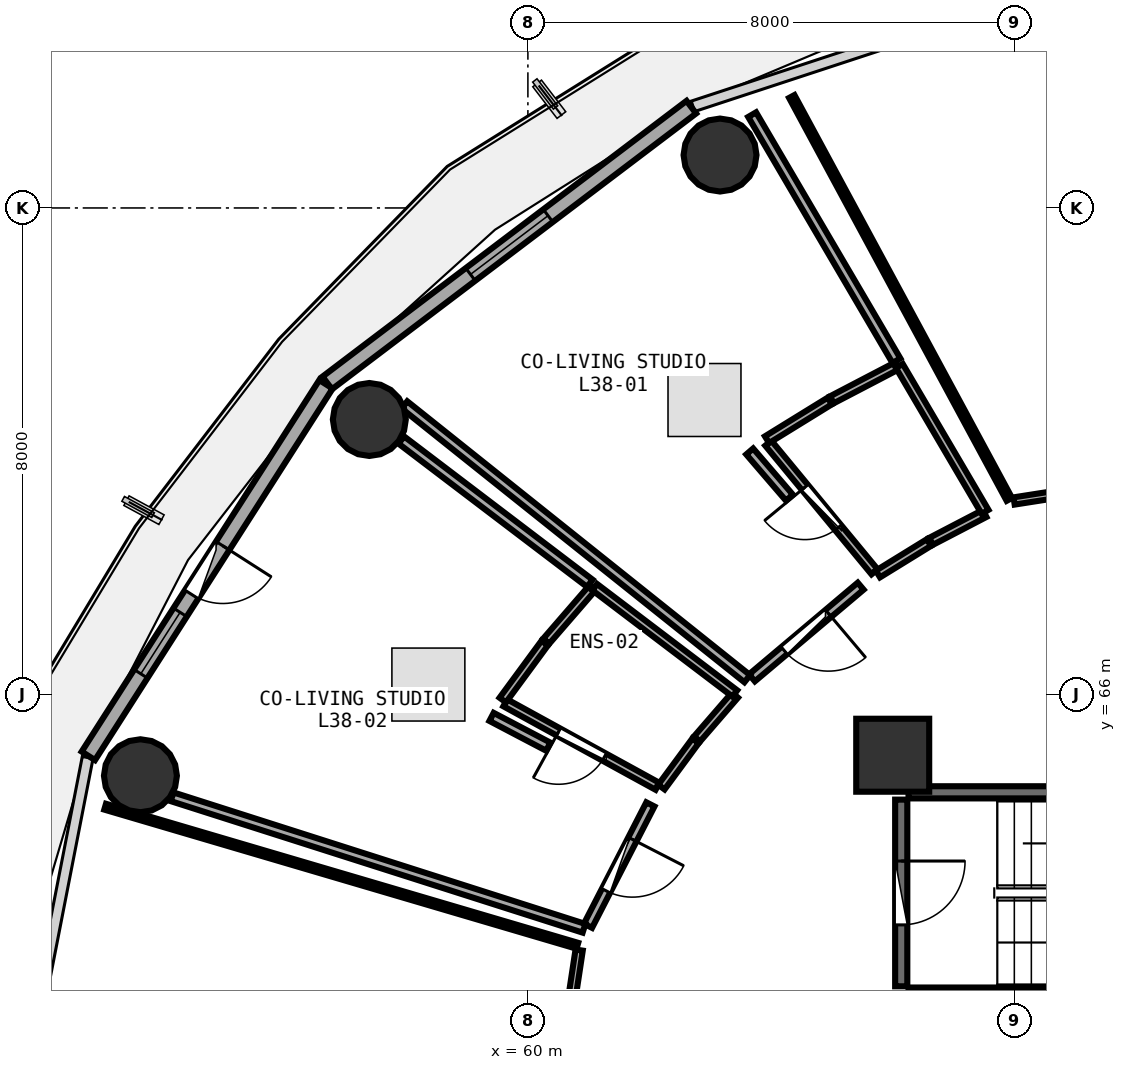
"""IFC4 building model, lengths in metres.
Left out: names, types, materials, properties, quantities, classifications, styles, units other than length and angle.
Written with IfcOpenShell. Run it as: python <this file> out.ifc"""

import sys

from ifc_helpers import new_model, si_unit, direction, frame, frame_2d, origin, origin_2d, place, context, subcontext, project, spatial, rectangle, circle, extrude, element, fill, save


model = new_model("IFC4")
c1 = context("Model", 3, precision=1e-05, world=origin(), true_north=direction((0.0, 1.0)))
c2 = subcontext(c1, "Body", "Model", "MODEL_VIEW")
j1 = project(units=[si_unit("LENGTHUNIT", "METRE"), si_unit("PLANEANGLEUNIT", "RADIAN")], contexts=[c1])
p1 = place(None, origin())
s1 = spatial("IfcSite", under=j1, at=p1, CompositionType="ELEMENT")
p2 = place(p1, origin())
s2 = spatial("IfcBuilding", under=s1, at=p2, CompositionType="ELEMENT")
p3 = place(p2, frame((0.0, 0.0, 150.6)))
s3 = spatial("IfcBuildingStorey", under=s2, at=p3, CompositionType="ELEMENT", Elevation=150.6)
p4 = place(p3, frame((66.0, 65.0, 0.0), z_axis=(0.0, 0.0, 1.0), x_axis=(1.0, 0.0, 0.0)))
e1 = element("IfcColumn", 1, at=p4, inside=s3, PredefinedType="PILASTER", context=c2, shape_type="SweptSolid", body=[
    extrude(rectangle(XDim=1.2, YDim=1.2, at=origin_2d()), origin(), (0.0, 0.0, 1.0), 3.75),
])
for number, where, z_axis, x_axis in (
    (2, (63.16, 74.87, 0.0), (0.0, 0.0, 1.0), (1.0, 0.0, 0.0)),
    (3, (57.392, 70.521, 0.0), (0.0, 0.0, 1.0), (1.0, 0.0, 0.0)),
    (4, (53.627, 64.663, 0.0), (0.0, 0.0, 1.0), (1.0, 0.0, 0.0)),
):
    element("IfcColumn", number, at=place(p3, frame(where, z_axis=z_axis, x_axis=x_axis)), inside=s3, PredefinedType="COLUMN", context=c2, shape_type="SweptSolid", body=[
        extrude(circle(Radius=0.6, at=origin_2d()), origin(), (0.0, 0.0, 1.0), 3.75),
    ])
p5 = place(p3, frame((62.688, 75.658, 0.0), z_axis=(0.0, 0.0, 1.0), x_axis=(-0.797163719609, -0.603763202042, 0.0)))
e5 = element("IfcWall", 5, at=p5, inside=s3, PredefinedType="SOLIDWALL", context=c2, shape_type="SweptSolid", body=[
    extrude(rectangle(XDim=7.512, YDim=0.26, at=frame_2d((3.756, 0.0))), origin(), (0.0, 0.0, 1.0), 3.475),
])
p6 = place(p5, frame((2.956, 0.0, 0.85)))
e6 = element("IfcOpeningElement", 6, at=p6, cuts=e5, PredefinedType="OPENING", context=c2, shape_type="SweptSolid", body=[
    extrude(rectangle(XDim=1.6, YDim=1.45, at=frame_2d((0.8, 0.725))), frame((0.0, 0.14, 0.0), z_axis=(0.0, -1.0, 0.0), x_axis=(1.0, 0.0, 0.0)), (0.0, 0.0, 1.0), 0.28),
])
p7 = place(p3, frame((56.679, 71.1, 0.0), z_axis=(0.0, 0.0, 1.0), x_axis=(-0.538801521808, -0.842432739213, 0.0)))
e7 = element("IfcWall", 7, at=p7, inside=s3, PredefinedType="SOLIDWALL", context=c2, shape_type="SweptSolid", body=[
    extrude(rectangle(XDim=7.253, YDim=0.26, at=frame_2d((3.627, 0.0))), origin(), (0.0, 0.0, 1.0), 3.475),
])
p8 = place(p7, frame((3.152, 0.0, 0.0)))
e8 = element("IfcOpeningElement", 8, at=p8, cuts=e7, PredefinedType="OPENING", context=c2, shape_type="SweptSolid", body=[
    extrude(rectangle(XDim=0.95, YDim=2.1, at=frame_2d((0.475, 1.05))), frame((0.0, 0.14, 0.0), z_axis=(0.0, -1.0, 0.0), x_axis=(1.0, 0.0, 0.0)), (0.0, 0.0, 1.0), 0.28),
])
p9 = place(p7, frame((4.452, 0.0, 0.85)))
e9 = element("IfcOpeningElement", 9, at=p9, cuts=e7, PredefinedType="OPENING", context=c2, shape_type="SweptSolid", body=[
    extrude(rectangle(XDim=1.2, YDim=1.45, at=frame_2d((0.6, 0.725))), frame((0.0, 0.14, 0.0), z_axis=(0.0, -1.0, 0.0), x_axis=(1.0, 0.0, 0.0)), (0.0, 0.0, 1.0), 0.28),
])
for number, where, z_axis, x_axis in (
    (10, (66.26, 61.08, 0.0), (0.0, 0.0, 1.0), (1.0, 0.0, 0.0)),
    (11, (73.42, 64.39, 0.0), (0.0, 0.0, 1.0), (-1.0, 0.0, 0.0)),
):
    element("IfcWall", number, at=place(p3, frame(where, z_axis=z_axis, x_axis=x_axis)), inside=s3, PredefinedType="SHEAR", context=c2, shape_type="SweptSolid", body=[
        extrude(rectangle(XDim=7.16, YDim=0.2, at=frame_2d((3.58, 0.0))), origin(), (0.0, 0.0, 1.0), 3.49),
    ])
p10 = place(p3, frame((66.14, 64.27, 0.0), z_axis=(0.0, 0.0, 1.0), x_axis=(0.0, -1.0, 0.0)))
e12 = element("IfcWall", 12, at=p10, inside=s3, PredefinedType="SHEAR", context=c2, shape_type="SweptSolid", body=[
    extrude(rectangle(XDim=3.07, YDim=0.2, at=frame_2d((1.535, 0.0))), origin(), (0.0, 0.0, 1.0), 3.49),
])
p11 = place(p10, frame((1.01, 0.0, 0.0)))
e13 = element("IfcOpeningElement", 13, at=p11, cuts=e12, PredefinedType="OPENING", context=c2, shape_type="SweptSolid", body=[
    extrude(rectangle(XDim=1.05, YDim=2.1, at=frame_2d((0.525, 1.05))), frame((0.0, 0.11, 0.0), z_axis=(0.0, -1.0, 0.0), x_axis=(1.0, 0.0, 0.0)), (0.0, 0.0, 1.0), 0.22),
])
p12 = place(p3, frame((75.447, 70.347, 0.0), z_axis=(0.0, 0.0, 1.0), x_axis=(-0.987988721118, -0.154526007337, 0.0)))
e14 = element("IfcWall", 14, at=p12, inside=s3, PredefinedType="PARTITIONING", context=c2, shape_type="SweptSolid", body=[
    extrude(rectangle(XDim=7.541, YDim=0.12, at=frame_2d((3.771, 0.0))), origin(), (0.0, 0.0, 1.0), 2.975),
])
p13 = place(p12, frame((3.32, 0.0, 0.0)))
e15 = element("IfcOpeningElement", 15, at=p13, cuts=e14, PredefinedType="OPENING", context=c2, shape_type="SweptSolid", body=[
    extrude(rectangle(XDim=0.9, YDim=2.08, at=frame_2d((0.45, 1.04))), frame((0.0, 0.07, 0.0), z_axis=(0.0, -1.0, 0.0), x_axis=(1.0, 0.0, 0.0)), (0.0, 0.0, 1.0), 0.14),
])
p14 = place(p3, frame((65.702, 68.016, 0.0), z_axis=(0.0, 0.0, 1.0), x_axis=(-0.636757315483, 0.771064278241, 0.0)))
e16 = element("IfcWall", 16, at=p14, inside=s3, PredefinedType="PLUMBINGWALL", context=c2, shape_type="SweptSolid", body=[
    extrude(rectangle(XDim=2.745, YDim=0.13, at=frame_2d((1.373, 0.0))), origin(), (0.0, 0.0, 1.0), 2.975),
])
p15 = place(p14, frame((0.942, 0.0, 0.0)))
e17 = element("IfcOpeningElement", 17, at=p15, cuts=e16, PredefinedType="OPENING", context=c2, shape_type="SweptSolid", body=[
    extrude(rectangle(XDim=0.86, YDim=2.05, at=frame_2d((0.43, 1.025))), frame((0.0, 0.075, 0.0), z_axis=(0.0, -1.0, 0.0), x_axis=(1.0, 0.0, 0.0)), (0.0, 0.0, 1.0), 0.15),
])
p16 = place(p3, frame((65.473, 67.78, 0.0), z_axis=(0.0, 0.0, 1.0), x_axis=(-0.764572750514, -0.644537438146, 0.0)))
e18 = element("IfcWall", 18, at=p16, inside=s3, PredefinedType="PARTITIONING", context=c2, shape_type="SweptSolid", body=[
    extrude(rectangle(XDim=2.339, YDim=0.15, at=frame_2d((1.169, 0.0))), origin(), (0.0, 0.0, 1.0), 2.975),
])
p17 = place(p16, frame((0.694, 0.0, 0.0)))
e19 = element("IfcOpeningElement", 19, at=p17, cuts=e18, PredefinedType="OPENING", context=c2, shape_type="SweptSolid", body=[
    extrude(rectangle(XDim=0.95, YDim=2.08, at=frame_2d((0.475, 1.04))), frame((0.0, 0.085, 0.0), z_axis=(0.0, -1.0, 0.0), x_axis=(1.0, 0.0, 0.0)), (0.0, 0.0, 1.0), 0.17),
])
p18 = place(p3, frame((62.131, 64.489, 0.0), z_axis=(0.0, 0.0, 1.0), x_axis=(-0.87680194327, 0.480851694681, 0.0)))
e20 = element("IfcWall", 20, at=p18, inside=s3, PredefinedType="PLUMBINGWALL", context=c2, shape_type="SweptSolid", body=[
    extrude(rectangle(XDim=2.855, YDim=0.13, at=frame_2d((1.428, 0.0))), origin(), (0.0, 0.0, 1.0), 2.975),
])
p19 = place(p18, frame((0.998, 0.0, 0.0)))
e21 = element("IfcOpeningElement", 21, at=p19, cuts=e20, PredefinedType="OPENING", context=c2, shape_type="SweptSolid", body=[
    extrude(rectangle(XDim=0.86, YDim=2.05, at=frame_2d((0.43, 1.025))), frame((0.0, 0.075, 0.0), z_axis=(0.0, -1.0, 0.0), x_axis=(1.0, 0.0, 0.0)), (0.0, 0.0, 1.0), 0.15),
])
p20 = place(p3, frame((62.015, 64.192, 0.0), z_axis=(0.0, 0.0, 1.0), x_axis=(-0.457234963971, -0.889345932538, 0.0)))
e22 = element("IfcWall", 22, at=p20, inside=s3, PredefinedType="PARTITIONING", context=c2, shape_type="SweptSolid", body=[
    extrude(rectangle(XDim=2.245, YDim=0.15, at=frame_2d((1.122, 0.0))), origin(), (0.0, 0.0, 1.0), 3.235),
])
p21 = place(p20, frame((0.647, 0.0, 0.0)))
e23 = element("IfcOpeningElement", 23, at=p21, cuts=e22, PredefinedType="OPENING", context=c2, shape_type="SweptSolid", body=[
    extrude(rectangle(XDim=0.95, YDim=2.08, at=frame_2d((0.475, 1.04))), frame((0.0, 0.085, 0.0), z_axis=(0.0, -1.0, 0.0), x_axis=(1.0, 0.0, 0.0)), (0.0, 0.0, 1.0), 0.17),
])
p22 = place(p3, frame((60.843, 61.796, 0.0), z_axis=(0.0, 0.0, 1.0), x_axis=(-0.149807046494, -0.988715251638, 0.0)))
e24 = element("IfcWall", 24, at=p22, inside=s3, PredefinedType="PARTITIONING", context=c2, shape_type="SweptSolid", body=[
    extrude(rectangle(XDim=4.338, YDim=0.12, at=frame_2d((2.169, 0.0))), origin(), (0.0, 0.0, 1.0), 2.975),
])
p23 = place(p22, frame((1.719, 0.0, 0.0)))
e25 = element("IfcOpeningElement", 25, at=p23, cuts=e24, PredefinedType="OPENING", context=c2, shape_type="SweptSolid", body=[
    extrude(rectangle(XDim=0.9, YDim=2.08, at=frame_2d((0.45, 1.04))), frame((0.0, 0.07, 0.0), z_axis=(0.0, -1.0, 0.0), x_axis=(1.0, 0.0, 0.0)), (0.0, 0.0, 1.0), 0.14),
])
p24 = place(p3, frame((67.918, 69.207, 0.0), z_axis=(0.0, 0.0, 1.0), x_axis=(-0.475160964166, 0.879898890858, 0.0)))
e26 = element("IfcWall", 26, at=p24, inside=s3, PredefinedType="PARTITIONING", context=c2, shape_type="SweptSolid", body=[
    extrude(rectangle(XDim=7.53, YDim=0.1, at=frame_2d((3.765, 0.0))), origin(), (0.0, 0.0, 1.0), 3.025),
])
p25 = place(p3, frame((67.511, 68.976, 0.0), z_axis=(0.0, 0.0, 1.0), x_axis=(-0.88687840459, -0.462002917168, 0.0)))
e27 = element("IfcWall", 27, at=p25, inside=s3, PredefinedType="PLUMBINGWALL", context=c2, shape_type="SweptSolid", body=[
    extrude(rectangle(XDim=0.993, YDim=0.13, at=frame_2d((0.497, 0.0))), origin(), (0.0, 0.0, 1.0), 3.235),
])
p26 = place(p3, frame((66.596, 68.498, 0.0), z_axis=(0.0, 0.0, 1.0), x_axis=(-0.851266784219, -0.52473313416, 0.0)))
e28 = element("IfcWall", 28, at=p26, inside=s3, PredefinedType="PLUMBINGWALL", context=c2, shape_type="SweptSolid", body=[
    extrude(rectangle(XDim=0.985, YDim=0.13, at=frame_2d((0.493, 0.0))), origin(), (0.0, 0.0, 1.0), 3.48),
])
p27 = place(p3, frame((63.933, 70.189, 0.0), z_axis=(0.0, 0.0, 1.0), x_axis=(0.851319302067, 0.524647925688, 0.0)))
e29 = element("IfcWall", 29, at=p27, inside=s3, PredefinedType="PLUMBINGWALL", context=c2, shape_type="SweptSolid", body=[
    extrude(rectangle(XDim=1.212, YDim=0.13, at=frame_2d((0.606, 0.0))), origin(), (0.0, 0.0, 1.0), 2.975),
])
p28 = place(p3, frame((65.0, 70.845, 0.0), z_axis=(0.0, 0.0, 1.0), x_axis=(0.886527747476, 0.462675429383, 0.0)))
e30 = element("IfcWall", 30, at=p28, inside=s3, PredefinedType="PLUMBINGWALL", context=c2, shape_type="SweptSolid", body=[
    extrude(rectangle(XDim=1.22, YDim=0.13, at=frame_2d((0.61, 0.0))), origin(), (0.0, 0.0, 1.0), 3.175),
])
p29 = place(p3, frame((66.109, 71.402, 0.0), z_axis=(0.0, 0.0, 1.0), x_axis=(0.506513995599, -0.862231739304, 0.0)))
e31 = element("IfcWall", 31, at=p29, inside=s3, PredefinedType="PLUMBINGWALL", context=c2, shape_type="SweptSolid", body=[
    extrude(rectangle(XDim=2.783, YDim=0.13, at=frame_2d((1.392, 0.0))), origin(), (0.0, 0.0, 1.0), 3.175),
])
p30 = place(p3, frame((63.608, 66.259, 0.0), z_axis=(0.0, 0.0, 1.0), x_axis=(-0.781429667655, 0.623993328898, 0.0)))
e32 = element("IfcWall", 32, at=p30, inside=s3, PredefinedType="PARTITIONING", context=c2, shape_type="SweptSolid", body=[
    extrude(rectangle(XDim=7.216, YDim=0.15, at=frame_2d((3.608, 0.0))), origin(), (0.0, 0.0, 1.0), 2.975),
])
p31 = place(p3, frame((63.688, 75.534, 0.0), z_axis=(0.0, 0.0, 1.0), x_axis=(0.505850409321, -0.862621216636, 0.0)))
e33 = element("IfcWall", 33, at=p31, inside=s3, PredefinedType="PARTITIONING", context=c2, shape_type="SweptSolid", body=[
    extrude(rectangle(XDim=4.69, YDim=0.15, at=frame_2d((2.345, 0.0))), origin(), (0.0, 0.0, 1.0), 3.025),
])
p32 = place(p3, frame((63.648, 69.996, 0.0), z_axis=(0.0, 0.0, 1.0), x_axis=(0.651733897109, -0.758447709047, 0.0)))
e34 = element("IfcWall", 34, at=p32, inside=s3, PredefinedType="PARTITIONING", context=c2, shape_type="SweptSolid", body=[
    extrude(rectangle(XDim=1.002, YDim=0.15, at=frame_2d((0.501, 0.0))), origin(), (0.0, 0.0, 1.0), 3.48),
])
p33 = place(p3, frame((63.406, 65.989, 0.0), z_axis=(0.0, 0.0, 1.0), x_axis=(-0.654452758924, -0.756102894015, 0.0)))
e35 = element("IfcWall", 35, at=p33, inside=s3, PredefinedType="PLUMBINGWALL", context=c2, shape_type="SweptSolid", body=[
    extrude(rectangle(XDim=0.954, YDim=0.13, at=frame_2d((0.477, 0.0))), origin(), (0.0, 0.0, 1.0), 3.48),
])
p34 = place(p3, frame((62.757, 65.237, 0.0), z_axis=(0.0, 0.0, 1.0), x_axis=(-0.593701036402, -0.804685702231, 0.0)))
e36 = element("IfcWall", 36, at=p34, inside=s3, PredefinedType="PLUMBINGWALL", context=c2, shape_type="SweptSolid", body=[
    extrude(rectangle(XDim=0.945, YDim=0.13, at=frame_2d((0.473, 0.0))), origin(), (0.0, 0.0, 1.0), 2.975),
])
p35 = place(p3, frame((59.587, 65.907, 0.0), z_axis=(0.0, 0.0, 1.0), x_axis=(0.592518663081, 0.805556722956, 0.0)))
e37 = element("IfcWall", 37, at=p35, inside=s3, PredefinedType="PLUMBINGWALL", context=c2, shape_type="SweptSolid", body=[
    extrude(rectangle(XDim=1.163, YDim=0.13, at=frame_2d((0.582, 0.0))), origin(), (0.0, 0.0, 1.0), 3.48),
])
p36 = place(p3, frame((60.301, 66.875, 0.0), z_axis=(0.0, 0.0, 1.0), x_axis=(0.654502595292, 0.756059754752, 0.0)))
e38 = element("IfcWall", 38, at=p36, inside=s3, PredefinedType="PLUMBINGWALL", context=c2, shape_type="SweptSolid", body=[
    extrude(rectangle(XDim=1.173, YDim=0.13, at=frame_2d((0.586, 0.0))), origin(), (0.0, 0.0, 1.0), 3.48),
])
p37 = place(p3, frame((61.098, 67.765, 0.0), z_axis=(0.0, 0.0, 1.0), x_axis=(0.796687067956, -0.604392021581, 0.0)))
e39 = element("IfcWall", 39, at=p37, inside=s3, PredefinedType="PLUMBINGWALL", context=c2, shape_type="SweptSolid", body=[
    extrude(rectangle(XDim=2.894, YDim=0.13, at=frame_2d((1.447, 0.0))), origin(), (0.0, 0.0, 1.0), 3.235),
])
p38 = place(p3, frame((60.923, 62.154, 0.0), z_axis=(0.0, 0.0, 1.0), x_axis=(-0.952653075659, 0.304059397878, 0.0)))
e40 = element("IfcWall", 40, at=p38, inside=s3, PredefinedType="PARTITIONING", context=c2, shape_type="SweptSolid", body=[
    extrude(rectangle(XDim=7.112, YDim=0.15, at=frame_2d((3.556, 0.0))), origin(), (0.0, 0.0, 1.0), 3.175),
])
p39 = place(p3, frame((57.918, 70.184, 0.0), z_axis=(0.0, 0.0, 1.0), x_axis=(0.796177895966, -0.605062606657, 0.0)))
e41 = element("IfcWall", 41, at=p39, inside=s3, PredefinedType="PARTITIONING", context=c2, shape_type="SweptSolid", body=[
    extrude(rectangle(XDim=3.895, YDim=0.15, at=frame_2d((1.948, 0.0))), origin(), (0.0, 0.0, 1.0), 2.975),
])
p40 = place(p3, frame((59.402, 65.63, 0.0), z_axis=(0.0, 0.0, 1.0), x_axis=(0.885450338388, -0.46473400806, 0.0)))
e42 = element("IfcWall", 42, at=p40, inside=s3, PredefinedType="PARTITIONING", context=c2, shape_type="SweptSolid", body=[
    extrude(rectangle(XDim=1.054, YDim=0.15, at=frame_2d((0.527, 0.0))), origin(), (0.0, 0.0, 1.0), 3.48),
])
p41 = place(p3, frame((53.047, 64.154, 0.0), z_axis=(0.0, 0.0, 1.0), x_axis=(0.959252584651, -0.282549958133, 0.0)))
e43 = element("IfcWall", 43, at=p41, inside=s3, PredefinedType="PARTITIONING", context=c2, shape_type="SweptSolid", body=[
    extrude(rectangle(XDim=8.096, YDim=0.1, at=frame_2d((4.048, 0.0))), origin(), (0.0, 0.0, 1.0), 3.025),
])
p42 = place(p6, origin())
e44 = element("IfcWindow", 44, at=p42, inside=s3, PartitioningType="SINGLE_PANEL", PredefinedType="WINDOW", context=c2, shape_type="SweptSolid", body=[
    extrude(rectangle(XDim=1.6, YDim=1.45, at=frame_2d((0.8, 0.725))), frame((0.0, 0.03, 0.0), z_axis=(0.0, -1.0, 0.0), x_axis=(1.0, 0.0, 0.0)), (0.0, 0.0, 1.0), 0.06),
])
fill(e6, e44)
p43 = place(p8, frame((0.95, 0.0, 0.0), z_axis=(0.0, 0.0, 1.0), x_axis=(-1.0, 0.0, 0.0)))
e45 = element("IfcDoor", 45, at=p43, inside=s3, OperationType="SINGLE_SWING_RIGHT", PredefinedType="DOOR", context=c2, shape_type="SweptSolid", body=[
    extrude(rectangle(XDim=0.95, YDim=2.1, at=frame_2d((0.475, 1.05))), frame((0.0, 0.025, 0.0), z_axis=(0.0, -1.0, 0.0), x_axis=(1.0, 0.0, 0.0)), (0.0, 0.0, 1.0), 0.05),
])
fill(e8, e45)
p44 = place(p9, origin())
e46 = element("IfcWindow", 46, at=p44, inside=s3, PartitioningType="SINGLE_PANEL", PredefinedType="WINDOW", context=c2, shape_type="SweptSolid", body=[
    extrude(rectangle(XDim=1.2, YDim=1.45, at=frame_2d((0.6, 0.725))), frame((0.0, 0.03, 0.0), z_axis=(0.0, -1.0, 0.0), x_axis=(1.0, 0.0, 0.0)), (0.0, 0.0, 1.0), 0.06),
])
fill(e9, e46)
p45 = place(p11, origin())
e47 = element("IfcDoor", 47, at=p45, inside=s3, OperationType="SINGLE_SWING_LEFT", PredefinedType="DOOR", context=c2, shape_type="SweptSolid", body=[
    extrude(rectangle(XDim=1.05, YDim=2.1, at=frame_2d((0.525, 1.05))), frame((0.0, 0.025, 0.0), z_axis=(0.0, -1.0, 0.0), x_axis=(1.0, 0.0, 0.0)), (0.0, 0.0, 1.0), 0.05),
])
fill(e13, e47)
p46 = place(p15, origin())
e48 = element("IfcDoor", 48, at=p46, inside=s3, OperationType="SINGLE_SWING_RIGHT", PredefinedType="DOOR", context=c2, shape_type="SweptSolid", body=[
    extrude(rectangle(XDim=0.86, YDim=2.05, at=frame_2d((0.43, 1.025))), frame((0.0, 0.025, 0.0), z_axis=(0.0, -1.0, 0.0), x_axis=(1.0, 0.0, 0.0)), (0.0, 0.0, 1.0), 0.05),
])
fill(e17, e48)
p47 = place(p17, origin())
e49 = element("IfcDoor", 49, at=p47, inside=s3, OperationType="SINGLE_SWING_LEFT", PredefinedType="DOOR", context=c2, shape_type="SweptSolid", body=[
    extrude(rectangle(XDim=0.95, YDim=2.08, at=frame_2d((0.475, 1.04))), frame((0.0, 0.025, 0.0), z_axis=(0.0, -1.0, 0.0), x_axis=(1.0, 0.0, 0.0)), (0.0, 0.0, 1.0), 0.05),
])
fill(e19, e49)
p48 = place(p19, origin())
e50 = element("IfcDoor", 50, at=p48, inside=s3, OperationType="SINGLE_SWING_RIGHT", PredefinedType="DOOR", context=c2, shape_type="SweptSolid", body=[
    extrude(rectangle(XDim=0.86, YDim=2.05, at=frame_2d((0.43, 1.025))), frame((0.0, 0.025, 0.0), z_axis=(0.0, -1.0, 0.0), x_axis=(1.0, 0.0, 0.0)), (0.0, 0.0, 1.0), 0.05),
])
fill(e21, e50)
p49 = place(p21, origin())
e51 = element("IfcDoor", 51, at=p49, inside=s3, OperationType="SINGLE_SWING_LEFT", PredefinedType="DOOR", context=c2, shape_type="SweptSolid", body=[
    extrude(rectangle(XDim=0.95, YDim=2.08, at=frame_2d((0.475, 1.04))), frame((0.0, 0.025, 0.0), z_axis=(0.0, -1.0, 0.0), x_axis=(1.0, 0.0, 0.0)), (0.0, 0.0, 1.0), 0.05),
])
fill(e23, e51)
save(model, sys.argv[1])
